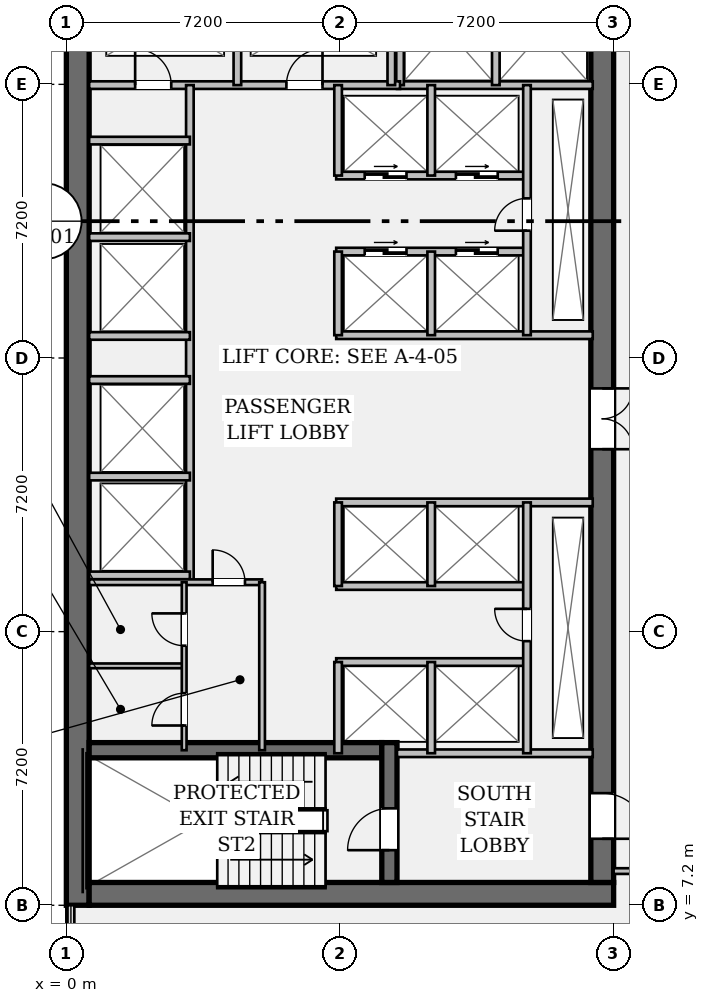
"""IFC4 building model, lengths in metres.
Left out: names, types, materials, properties, quantities, classifications, styles, units other than length and angle.
Written with IfcOpenShell. Run it as: python <this file> out.ifc"""

import sys

from ifc_helpers import new_model, si_unit, direction, frame, frame_2d, origin, place, context, subcontext, project, spatial, rectangle, extrude, element, fill, save


model = new_model("IFC4")
c1 = context("Model", 3, precision=1e-05, world=origin(), true_north=direction((0.0, 1.0)))
c2 = subcontext(c1, "Body", "Model", "MODEL_VIEW")
j1 = project(units=[si_unit("LENGTHUNIT", "METRE"), si_unit("PLANEANGLEUNIT", "RADIAN")], contexts=[c1])
p1 = place(None, origin())
s1 = spatial("IfcSite", under=j1, at=p1, CompositionType="ELEMENT")
p2 = place(p1, origin())
s2 = spatial("IfcBuilding", under=s1, at=p2, CompositionType="ELEMENT")
p3 = place(p2, frame((0.0, 0.0, 65.8)))
s3 = spatial("IfcBuildingStorey", under=s2, at=p3, CompositionType="ELEMENT", Elevation=65.8)
p4 = place(p3, frame((0.3, 7.2, 0.0), z_axis=(0.0, 0.0, 1.0), x_axis=(0.0, 1.0, 0.0)))
e1 = element("IfcWall", 1, at=p4, inside=s3, PredefinedType="SHEAR", context=c2, shape_type="SweptSolid", body=[
    extrude(rectangle(XDim=28.8, YDim=0.6, at=frame_2d((14.4, 0.0))), origin(), (0.0, 0.0, 1.0), 3.57),
])
p5 = place(p3, frame((0.6, 7.5, 0.0), z_axis=(0.0, 0.0, 1.0), x_axis=(1.0, 0.0, 0.0)))
e2 = element("IfcWall", 2, at=p5, inside=s3, PredefinedType="SHEAR", context=c2, shape_type="SweptSolid", body=[
    extrude(rectangle(XDim=13.8, YDim=0.6, at=frame_2d((6.9, 0.0))), origin(), (0.0, 0.0, 1.0), 3.57),
])
p6 = place(p3, frame((14.1, 35.4, 0.0), z_axis=(0.0, 0.0, 1.0), x_axis=(0.0, -1.0, 0.0)))
e3 = element("IfcWall", 3, at=p6, inside=s3, PredefinedType="SHEAR", context=c2, shape_type="SweptSolid", body=[
    extrude(rectangle(XDim=27.6, YDim=0.6, at=frame_2d((13.8, 0.0))), origin(), (0.0, 0.0, 1.0), 3.57),
])
p7 = place(p6, frame((1.3, 0.0, 0.0)))
e4 = element("IfcOpeningElement", 4, at=p7, cuts=e3, PredefinedType="OPENING", context=c2, shape_type="SweptSolid", body=[
    extrude(rectangle(XDim=1.2, YDim=2.15, at=frame_2d((0.6, 1.075))), frame((0.0, 0.312, 0.0), z_axis=(0.0, -1.0, 0.0), x_axis=(1.0, 0.0, 0.0)), (0.0, 0.0, 1.0), 0.624),
])
p8 = place(p6, frame((25.25, 0.0, 0.0)))
e5 = element("IfcOpeningElement", 5, at=p8, cuts=e3, PredefinedType="OPENING", context=c2, shape_type="SweptSolid", body=[
    extrude(rectangle(XDim=1.2, YDim=2.15, at=frame_2d((0.6, 1.075))), frame((0.0, 0.312, 0.0), z_axis=(0.0, -1.0, 0.0), x_axis=(1.0, 0.0, 0.0)), (0.0, 0.0, 1.0), 0.624),
])
p9 = place(p6, frame((14.6, 0.0, 0.0)))
e6 = element("IfcOpeningElement", 6, at=p9, cuts=e3, PredefinedType="OPENING", context=c2, shape_type="SweptSolid", body=[
    extrude(rectangle(XDim=1.6, YDim=2.2, at=frame_2d((0.8, 1.1))), frame((0.0, 0.312, 0.0), z_axis=(0.0, -1.0, 0.0), x_axis=(1.0, 0.0, 0.0)), (0.0, 0.0, 1.0), 0.624),
])
p10 = place(p3, frame((0.6, 11.28, 0.0), z_axis=(0.0, 0.0, 1.0), x_axis=(1.0, 0.0, 0.0)))
e7 = element("IfcWall", 7, at=p10, inside=s3, PredefinedType="SHEAR", context=c2, shape_type="SweptSolid", body=[
    extrude(rectangle(XDim=7.7, YDim=0.4, at=frame_2d((3.85, 0.0))), origin(), (0.0, 0.0, 1.0), 3.57),
])
p11 = place(p3, frame((8.5, 7.8, 0.0), z_axis=(0.0, 0.0, 1.0), x_axis=(0.0, 1.0, 0.0)))
e8 = element("IfcWall", 8, at=p11, inside=s3, PredefinedType="SHEAR", context=c2, shape_type="SweptSolid", body=[
    extrude(rectangle(XDim=3.68, YDim=0.4, at=frame_2d((1.84, 0.0))), origin(), (0.0, 0.0, 1.0), 3.57),
])
p12 = place(p11, frame((0.85, 0.0, 0.0)))
e9 = element("IfcOpeningElement", 9, at=p12, cuts=e8, PredefinedType="OPENING", context=c2, shape_type="SweptSolid", body=[
    extrude(rectangle(XDim=1.1, YDim=2.15, at=frame_2d((0.55, 1.075))), frame((0.0, 0.212, 0.0), z_axis=(0.0, -1.0, 0.0), x_axis=(1.0, 0.0, 0.0)), (0.0, 0.0, 1.0), 0.424),
])
for number, where, z_axis, x_axis in (
    (10, (8.7, 11.2, 0.0), (0.0, 0.0, 1.0), (1.0, 0.0, 0.0)),
    (11, (8.7, 28.78, 0.0), (0.0, 0.0, 1.0), (1.0, 0.0, 0.0)),
):
    element("IfcWall", number, at=place(p3, frame(where, z_axis=z_axis, x_axis=x_axis)), inside=s3, PredefinedType="PARTITIONING", context=c2, shape_type="SweptSolid", body=[
        extrude(rectangle(XDim=5.15, YDim=0.2, at=frame_2d((2.575, 0.0))), origin(), (0.0, 0.0, 1.0), 3.57),
    ])
for number, where, z_axis, x_axis in (
    (12, (8.78, 28.78, 0.0), (0.0, 0.0, 1.0), (0.0, 1.0, 0.0)),
    (13, (11.3, 28.78, 0.0), (0.0, 0.0, 1.0), (0.0, 1.0, 0.0)),
):
    element("IfcWall", number, at=place(p3, frame(where, z_axis=z_axis, x_axis=x_axis)), inside=s3, PredefinedType="PARTITIONING", context=c2, shape_type="SweptSolid", body=[
        extrude(rectangle(XDim=3.1, YDim=0.2, at=frame_2d((1.55, 0.0))), origin(), (0.0, 0.0, 1.0), 3.57),
    ])
p13 = place(p3, frame((0.6, 28.78, 0.0), z_axis=(0.0, 0.0, 1.0), x_axis=(1.0, 0.0, 0.0)))
e14 = element("IfcWall", 14, at=p13, inside=s3, PredefinedType="PARTITIONING", context=c2, shape_type="SweptSolid", body=[
    extrude(rectangle(XDim=8.18, YDim=0.2, at=frame_2d((4.09, 0.0))), origin(), (0.0, 0.0, 1.0), 3.57),
])
p14 = place(p13, frame((1.21, 0.0, 0.0)))
e15 = element("IfcOpeningElement", 15, at=p14, cuts=e14, PredefinedType="OPENING", context=c2, shape_type="SweptSolid", body=[
    extrude(rectangle(XDim=0.95, YDim=2.15, at=frame_2d((0.475, 1.075))), frame((0.0, 0.112, 0.0), z_axis=(0.0, -1.0, 0.0), x_axis=(1.0, 0.0, 0.0)), (0.0, 0.0, 1.0), 0.224),
])
p15 = place(p13, frame((5.19, 0.0, 0.0)))
e16 = element("IfcOpeningElement", 16, at=p15, cuts=e14, PredefinedType="OPENING", context=c2, shape_type="SweptSolid", body=[
    extrude(rectangle(XDim=0.95, YDim=2.15, at=frame_2d((0.475, 1.075))), frame((0.0, 0.112, 0.0), z_axis=(0.0, -1.0, 0.0), x_axis=(1.0, 0.0, 0.0)), (0.0, 0.0, 1.0), 0.224),
])
for number, where, z_axis, x_axis in (
    (17, (4.5, 28.78, 0.0), (0.0, 0.0, 1.0), (0.0, 1.0, 0.0)),
    (18, (8.55, 28.78, 0.0), (0.0, 0.0, 1.0), (0.0, 1.0, 0.0)),
):
    element("IfcWall", number, at=place(p3, frame(where, z_axis=z_axis, x_axis=x_axis)), inside=s3, PredefinedType="PARTITIONING", context=c2, shape_type="SweptSolid", body=[
        extrude(rectangle(XDim=2.94, YDim=0.2, at=frame_2d((1.47, 0.0))), origin(), (0.0, 0.0, 1.0), 3.57),
    ])
p16 = place(p3, frame((3.25, 15.7, 0.0), z_axis=(0.0, 0.0, 1.0), x_axis=(0.0, 1.0, 0.0)))
e19 = element("IfcWall", 19, at=p16, inside=s3, PredefinedType="PARTITIONING", context=c2, shape_type="SweptSolid", body=[
    extrude(rectangle(XDim=13.08, YDim=0.2, at=frame_2d((6.54, 0.0))), origin(), (0.0, 0.0, 1.0), 3.57),
])
for number, where, z_axis, x_axis in (
    (20, (0.6, 15.88, 0.0), (0.0, 0.0, 1.0), (1.0, 0.0, 0.0)),
    (21, (0.6, 18.48, 0.0), (0.0, 0.0, 1.0), (1.0, 0.0, 0.0)),
    (22, (0.6, 22.18, 0.0), (0.0, 0.0, 1.0), (1.0, 0.0, 0.0)),
    (23, (0.6, 24.78, 0.0), (0.0, 0.0, 1.0), (1.0, 0.0, 0.0)),
    (24, (0.6, 21.02, 0.0), (0.0, 0.0, 1.0), (1.0, 0.0, 0.0)),
    (25, (0.6, 27.32, 0.0), (0.0, 0.0, 1.0), (1.0, 0.0, 0.0)),
):
    element("IfcWall", number, at=place(p3, frame(where, z_axis=z_axis, x_axis=x_axis)), inside=s3, PredefinedType="PARTITIONING", context=c2, shape_type="SweptSolid", body=[
        extrude(rectangle(XDim=2.65, YDim=0.2, at=frame_2d((1.325, 0.0))), origin(), (0.0, 0.0, 1.0), 3.57),
    ])
p17 = place(p3, frame((7.1, 22.2, 0.0), z_axis=(0.0, 0.0, 1.0), x_axis=(1.0, 0.0, 0.0)))
e26 = element("IfcWall", 26, at=p17, inside=s3, PredefinedType="PARTITIONING", context=c2, shape_type="SweptSolid", body=[
    extrude(rectangle(XDim=6.75, YDim=0.2, at=frame_2d((3.375, 0.0))), origin(), (0.0, 0.0, 1.0), 3.57),
])
p18 = place(p3, frame((7.1, 24.4, 0.0), z_axis=(0.0, 0.0, 1.0), x_axis=(1.0, 0.0, 0.0)))
e27 = element("IfcWall", 27, at=p18, inside=s3, PredefinedType="PARTITIONING", context=c2, shape_type="SweptSolid", body=[
    extrude(rectangle(XDim=5.02, YDim=0.2, at=frame_2d((2.51, 0.0))), origin(), (0.0, 0.0, 1.0), 3.57),
])
p19 = place(p18, frame((0.75, 0.0, 0.0)))
e28 = element("IfcOpeningElement", 28, at=p19, cuts=e27, PredefinedType="OPENING", context=c2, shape_type="SweptSolid", body=[
    extrude(rectangle(XDim=1.1, YDim=2.2, at=frame_2d((0.55, 1.1))), frame((0.0, 0.112, 0.0), z_axis=(0.0, -1.0, 0.0), x_axis=(1.0, 0.0, 0.0)), (0.0, 0.0, 1.0), 0.224),
])
p20 = place(p18, frame((3.15, 0.0, 0.0)))
e29 = element("IfcOpeningElement", 29, at=p20, cuts=e27, PredefinedType="OPENING", context=c2, shape_type="SweptSolid", body=[
    extrude(rectangle(XDim=1.1, YDim=2.2, at=frame_2d((0.55, 1.1))), frame((0.0, 0.112, 0.0), z_axis=(0.0, -1.0, 0.0), x_axis=(1.0, 0.0, 0.0)), (0.0, 0.0, 1.0), 0.224),
])
p21 = place(p3, frame((7.1, 26.4, 0.0), z_axis=(0.0, 0.0, 1.0), x_axis=(1.0, 0.0, 0.0)))
e30 = element("IfcWall", 30, at=p21, inside=s3, PredefinedType="PARTITIONING", context=c2, shape_type="SweptSolid", body=[
    extrude(rectangle(XDim=5.02, YDim=0.2, at=frame_2d((2.51, 0.0))), origin(), (0.0, 0.0, 1.0), 3.57),
])
p22 = place(p21, frame((0.75, 0.0, 0.0)))
e31 = element("IfcOpeningElement", 31, at=p22, cuts=e30, PredefinedType="OPENING", context=c2, shape_type="SweptSolid", body=[
    extrude(rectangle(XDim=1.1, YDim=2.2, at=frame_2d((0.55, 1.1))), frame((0.0, 0.112, 0.0), z_axis=(0.0, -1.0, 0.0), x_axis=(1.0, 0.0, 0.0)), (0.0, 0.0, 1.0), 0.224),
])
p23 = place(p21, frame((3.15, 0.0, 0.0)))
e32 = element("IfcOpeningElement", 32, at=p23, cuts=e30, PredefinedType="OPENING", context=c2, shape_type="SweptSolid", body=[
    extrude(rectangle(XDim=1.1, YDim=2.2, at=frame_2d((0.55, 1.1))), frame((0.0, 0.112, 0.0), z_axis=(0.0, -1.0, 0.0), x_axis=(1.0, 0.0, 0.0)), (0.0, 0.0, 1.0), 0.224),
])
p24 = place(p3, frame((7.15, 22.2, 0.0), z_axis=(0.0, 0.0, 1.0), x_axis=(0.0, 1.0, 0.0)))
e33 = element("IfcWall", 33, at=p24, inside=s3, PredefinedType="PARTITIONING", context=c2, shape_type="SweptSolid", body=[
    extrude(rectangle(XDim=2.2, YDim=0.2, at=frame_2d((1.1, 0.0))), origin(), (0.0, 0.0, 1.0), 3.57),
])
p25 = place(p3, frame((7.15, 26.4, 0.0), z_axis=(0.0, 0.0, 1.0), x_axis=(0.0, 1.0, 0.0)))
e34 = element("IfcWall", 34, at=p25, inside=s3, PredefinedType="PARTITIONING", context=c2, shape_type="SweptSolid", body=[
    extrude(rectangle(XDim=2.38, YDim=0.2, at=frame_2d((1.19, 0.0))), origin(), (0.0, 0.0, 1.0), 3.57),
])
p26 = place(p3, frame((9.6, 22.2, 0.0), z_axis=(0.0, 0.0, 1.0), x_axis=(0.0, 1.0, 0.0)))
e35 = element("IfcWall", 35, at=p26, inside=s3, PredefinedType="PARTITIONING", context=c2, shape_type="SweptSolid", body=[
    extrude(rectangle(XDim=2.2, YDim=0.2, at=frame_2d((1.1, 0.0))), origin(), (0.0, 0.0, 1.0), 3.57),
])
p27 = place(p3, frame((9.6, 26.4, 0.0), z_axis=(0.0, 0.0, 1.0), x_axis=(0.0, 1.0, 0.0)))
e36 = element("IfcWall", 36, at=p27, inside=s3, PredefinedType="PARTITIONING", context=c2, shape_type="SweptSolid", body=[
    extrude(rectangle(XDim=2.38, YDim=0.2, at=frame_2d((1.19, 0.0))), origin(), (0.0, 0.0, 1.0), 3.57),
])
p28 = place(p3, frame((12.12, 22.2, 0.0), z_axis=(0.0, 0.0, 1.0), x_axis=(0.0, 1.0, 0.0)))
e37 = element("IfcWall", 37, at=p28, inside=s3, PredefinedType="PARTITIONING", context=c2, shape_type="SweptSolid", body=[
    extrude(rectangle(XDim=6.58, YDim=0.2, at=frame_2d((3.29, 0.0))), origin(), (0.0, 0.0, 1.0), 3.57),
])
p29 = place(p28, frame((2.75, 0.0, 0.0)))
e38 = element("IfcOpeningElement", 38, at=p29, cuts=e37, PredefinedType="OPENING", context=c2, shape_type="SweptSolid", body=[
    extrude(rectangle(XDim=0.85, YDim=2.15, at=frame_2d((0.425, 1.075))), frame((0.0, 0.112, 0.0), z_axis=(0.0, -1.0, 0.0), x_axis=(1.0, 0.0, 0.0)), (0.0, 0.0, 1.0), 0.224),
])
p30 = place(p3, frame((7.1, 17.8, 0.0), z_axis=(0.0, 0.0, 1.0), x_axis=(1.0, 0.0, 0.0)))
e39 = element("IfcWall", 39, at=p30, inside=s3, PredefinedType="PARTITIONING", context=c2, shape_type="SweptSolid", body=[
    extrude(rectangle(XDim=6.75, YDim=0.2, at=frame_2d((3.375, 0.0))), origin(), (0.0, 0.0, 1.0), 3.57),
])
for number, where, z_axis, x_axis in (
    (40, (7.1, 15.6, 0.0), (0.0, 0.0, 1.0), (1.0, 0.0, 0.0)),
    (41, (7.1, 13.6, 0.0), (0.0, 0.0, 1.0), (1.0, 0.0, 0.0)),
):
    element("IfcWall", number, at=place(p3, frame(where, z_axis=z_axis, x_axis=x_axis)), inside=s3, PredefinedType="PARTITIONING", context=c2, shape_type="SweptSolid", body=[
        extrude(rectangle(XDim=5.02, YDim=0.2, at=frame_2d((2.51, 0.0))), origin(), (0.0, 0.0, 1.0), 3.57),
    ])
p31 = place(p3, frame((7.15, 15.6, 0.0), z_axis=(0.0, 0.0, 1.0), x_axis=(0.0, 1.0, 0.0)))
e42 = element("IfcWall", 42, at=p31, inside=s3, PredefinedType="PARTITIONING", context=c2, shape_type="SweptSolid", body=[
    extrude(rectangle(XDim=2.2, YDim=0.2, at=frame_2d((1.1, 0.0))), origin(), (0.0, 0.0, 1.0), 3.57),
])
p32 = place(p3, frame((7.15, 11.2, 0.0), z_axis=(0.0, 0.0, 1.0), x_axis=(0.0, 1.0, 0.0)))
e43 = element("IfcWall", 43, at=p32, inside=s3, PredefinedType="PARTITIONING", context=c2, shape_type="SweptSolid", body=[
    extrude(rectangle(XDim=2.4, YDim=0.2, at=frame_2d((1.2, 0.0))), origin(), (0.0, 0.0, 1.0), 3.57),
])
p33 = place(p3, frame((9.6, 15.6, 0.0), z_axis=(0.0, 0.0, 1.0), x_axis=(0.0, 1.0, 0.0)))
e44 = element("IfcWall", 44, at=p33, inside=s3, PredefinedType="PARTITIONING", context=c2, shape_type="SweptSolid", body=[
    extrude(rectangle(XDim=2.2, YDim=0.2, at=frame_2d((1.1, 0.0))), origin(), (0.0, 0.0, 1.0), 3.57),
])
p34 = place(p3, frame((9.6, 11.2, 0.0), z_axis=(0.0, 0.0, 1.0), x_axis=(0.0, 1.0, 0.0)))
e45 = element("IfcWall", 45, at=p34, inside=s3, PredefinedType="PARTITIONING", context=c2, shape_type="SweptSolid", body=[
    extrude(rectangle(XDim=2.4, YDim=0.2, at=frame_2d((1.2, 0.0))), origin(), (0.0, 0.0, 1.0), 3.57),
])
p35 = place(p3, frame((12.12, 11.2, 0.0), z_axis=(0.0, 0.0, 1.0), x_axis=(0.0, 1.0, 0.0)))
e46 = element("IfcWall", 46, at=p35, inside=s3, PredefinedType="PARTITIONING", context=c2, shape_type="SweptSolid", body=[
    extrude(rectangle(XDim=6.6, YDim=0.2, at=frame_2d((3.3, 0.0))), origin(), (0.0, 0.0, 1.0), 3.57),
])
p36 = place(p35, frame((2.95, 0.0, 0.0)))
e47 = element("IfcOpeningElement", 47, at=p36, cuts=e46, PredefinedType="OPENING", context=c2, shape_type="SweptSolid", body=[
    extrude(rectangle(XDim=0.85, YDim=2.15, at=frame_2d((0.425, 1.075))), frame((0.0, 0.112, 0.0), z_axis=(0.0, -1.0, 0.0), x_axis=(1.0, 0.0, 0.0)), (0.0, 0.0, 1.0), 0.224),
])
p37 = place(p3, frame((0.6, 15.7, 0.0), z_axis=(0.0, 0.0, 1.0), x_axis=(1.0, 0.0, 0.0)))
e48 = element("IfcWall", 48, at=p37, inside=s3, PredefinedType="PARTITIONING", context=c2, shape_type="SweptSolid", body=[
    extrude(rectangle(XDim=4.55, YDim=0.15, at=frame_2d((2.275, 0.0))), origin(), (0.0, 0.0, 1.0), 3.57),
])
p38 = place(p37, frame((3.25, 0.0, 0.0)))
e49 = element("IfcOpeningElement", 49, at=p38, cuts=e48, PredefinedType="OPENING", context=c2, shape_type="SweptSolid", body=[
    extrude(rectangle(XDim=0.85, YDim=2.15, at=frame_2d((0.425, 1.075))), frame((0.0, 0.087, 0.0), z_axis=(0.0, -1.0, 0.0), x_axis=(1.0, 0.0, 0.0)), (0.0, 0.0, 1.0), 0.174),
])
p39 = place(p3, frame((5.15, 11.28, 0.0), z_axis=(0.0, 0.0, 1.0), x_axis=(0.0, 1.0, 0.0)))
e50 = element("IfcWall", 50, at=p39, inside=s3, PredefinedType="PARTITIONING", context=c2, shape_type="SweptSolid", body=[
    extrude(rectangle(XDim=4.42, YDim=0.15, at=frame_2d((2.21, 0.0))), origin(), (0.0, 0.0, 1.0), 3.57),
])
p40 = place(p3, frame((0.6, 13.5, 0.0), z_axis=(0.0, 0.0, 1.0), x_axis=(1.0, 0.0, 0.0)))
e51 = element("IfcWall", 51, at=p40, inside=s3, PredefinedType="PARTITIONING", context=c2, shape_type="SweptSolid", body=[
    extrude(rectangle(XDim=2.5, YDim=0.125, at=frame_2d((1.25, 0.0))), origin(), (0.0, 0.0, 1.0), 3.57),
])
p41 = place(p3, frame((3.1, 11.28, 0.0), z_axis=(0.0, 0.0, 1.0), x_axis=(0.0, 1.0, 0.0)))
e52 = element("IfcWall", 52, at=p41, inside=s3, PredefinedType="PARTITIONING", context=c2, shape_type="SweptSolid", body=[
    extrude(rectangle(XDim=4.42, YDim=0.125, at=frame_2d((2.21, 0.0))), origin(), (0.0, 0.0, 1.0), 3.57),
])
p42 = place(p41, frame((0.65, 0.0, 0.0)))
e53 = element("IfcOpeningElement", 53, at=p42, cuts=e52, PredefinedType="OPENING", context=c2, shape_type="SweptSolid", body=[
    extrude(rectangle(XDim=0.85, YDim=2.15, at=frame_2d((0.425, 1.075))), frame((0.0, 0.074, 0.0), z_axis=(0.0, -1.0, 0.0), x_axis=(1.0, 0.0, 0.0)), (0.0, 0.0, 1.0), 0.149),
])
p43 = place(p41, frame((2.75, 0.0, 0.0)))
e54 = element("IfcOpeningElement", 54, at=p43, cuts=e52, PredefinedType="OPENING", context=c2, shape_type="SweptSolid", body=[
    extrude(rectangle(XDim=0.85, YDim=2.15, at=frame_2d((0.425, 1.075))), frame((0.0, 0.074, 0.0), z_axis=(0.0, -1.0, 0.0), x_axis=(1.0, 0.0, 0.0)), (0.0, 0.0, 1.0), 0.149),
])
p44 = place(p3, frame((14.4, 8.1, 0.0), z_axis=(0.0, 0.0, 1.0), x_axis=(1.0, 0.0, 0.0)))
e55 = element("IfcWall", 55, at=p44, inside=s3, PredefinedType="PARTITIONING", context=c2, shape_type="SweptSolid", body=[
    extrude(rectangle(XDim=2.95, YDim=0.15, at=frame_2d((1.475, 0.0))), origin(), (0.0, 0.0, 1.0), 3.088),
])
p45 = place(p44, frame((0.95, 0.0, 0.0)))
e56 = element("IfcOpeningElement", 56, at=p45, cuts=e55, PredefinedType="OPENING", context=c2, shape_type="SweptSolid", body=[
    extrude(rectangle(XDim=0.95, YDim=2.15, at=frame_2d((0.475, 1.075))), frame((0.0, 0.087, 0.0), z_axis=(0.0, -1.0, 0.0), x_axis=(1.0, 0.0, 0.0)), (0.0, 0.0, 1.0), 0.174),
])
p46 = place(p12, origin())
e57 = element("IfcDoor", 57, at=p46, inside=s3, OperationType="SINGLE_SWING_LEFT", PredefinedType="DOOR", context=c2, shape_type="SweptSolid", body=[
    extrude(rectangle(XDim=1.1, YDim=2.15, at=frame_2d((0.55, 1.075))), frame((0.0, 0.025, 0.0), z_axis=(0.0, -1.0, 0.0), x_axis=(1.0, 0.0, 0.0)), (0.0, 0.0, 1.0), 0.05),
])
fill(e9, e57)
p47 = place(p8, origin())
e58 = element("IfcDoor", 58, at=p47, inside=s3, OperationType="SINGLE_SWING_RIGHT", PredefinedType="DOOR", context=c2, shape_type="SweptSolid", body=[
    extrude(rectangle(XDim=1.2, YDim=2.15, at=frame_2d((0.6, 1.075))), frame((0.0, 0.025, 0.0), z_axis=(0.0, -1.0, 0.0), x_axis=(1.0, 0.0, 0.0)), (0.0, 0.0, 1.0), 0.05),
])
fill(e5, e58)
p48 = place(p14, origin())
e59 = element("IfcDoor", 59, at=p48, inside=s3, OperationType="SINGLE_SWING_LEFT", PredefinedType="DOOR", context=c2, shape_type="SweptSolid", body=[
    extrude(rectangle(XDim=0.95, YDim=2.15, at=frame_2d((0.475, 1.075))), frame((0.0, 0.025, 0.0), z_axis=(0.0, -1.0, 0.0), x_axis=(1.0, 0.0, 0.0)), (0.0, 0.0, 1.0), 0.05),
])
fill(e15, e59)
p49 = place(p15, origin())
e60 = element("IfcDoor", 60, at=p49, inside=s3, OperationType="SINGLE_SWING_RIGHT", PredefinedType="DOOR", context=c2, shape_type="SweptSolid", body=[
    extrude(rectangle(XDim=0.95, YDim=2.15, at=frame_2d((0.475, 1.075))), frame((0.0, 0.025, 0.0), z_axis=(0.0, -1.0, 0.0), x_axis=(1.0, 0.0, 0.0)), (0.0, 0.0, 1.0), 0.05),
])
fill(e16, e60)
p50 = place(p9, origin())
e61 = element("IfcDoor", 61, at=p50, inside=s3, OperationType="DOUBLE_DOOR_SINGLE_SWING", PredefinedType="DOOR", context=c2, shape_type="SweptSolid", body=[
    extrude(rectangle(XDim=1.6, YDim=2.2, at=frame_2d((0.8, 1.1))), frame((0.0, 0.025, 0.0), z_axis=(0.0, -1.0, 0.0), x_axis=(1.0, 0.0, 0.0)), (0.0, 0.0, 1.0), 0.05),
])
fill(e6, e61)
p51 = place(p29, origin())
e62 = element("IfcDoor", 62, at=p51, inside=s3, OperationType="SINGLE_SWING_LEFT", PredefinedType="DOOR", context=c2, shape_type="SweptSolid", body=[
    extrude(rectangle(XDim=0.85, YDim=2.15, at=frame_2d((0.425, 1.075))), frame((0.0, 0.025, 0.0), z_axis=(0.0, -1.0, 0.0), x_axis=(1.0, 0.0, 0.0)), (0.0, 0.0, 1.0), 0.05),
])
fill(e38, e62)
p52 = place(p19, origin())
e63 = element("IfcDoor", 63, at=p52, inside=s3, OperationType="DOUBLE_DOOR_SLIDING", PredefinedType="DOOR", context=c2, shape_type="SweptSolid", body=[
    extrude(rectangle(XDim=1.1, YDim=2.2, at=frame_2d((0.55, 1.1))), frame((0.0, 0.025, 0.0), z_axis=(0.0, -1.0, 0.0), x_axis=(1.0, 0.0, 0.0)), (0.0, 0.0, 1.0), 0.05),
])
fill(e28, e63)
p53 = place(p20, origin())
e64 = element("IfcDoor", 64, at=p53, inside=s3, OperationType="DOUBLE_DOOR_SLIDING", PredefinedType="DOOR", context=c2, shape_type="SweptSolid", body=[
    extrude(rectangle(XDim=1.1, YDim=2.2, at=frame_2d((0.55, 1.1))), frame((0.0, 0.025, 0.0), z_axis=(0.0, -1.0, 0.0), x_axis=(1.0, 0.0, 0.0)), (0.0, 0.0, 1.0), 0.05),
])
fill(e29, e64)
p54 = place(p22, origin())
e65 = element("IfcDoor", 65, at=p54, inside=s3, OperationType="DOUBLE_DOOR_SLIDING", PredefinedType="DOOR", context=c2, shape_type="SweptSolid", body=[
    extrude(rectangle(XDim=1.1, YDim=2.2, at=frame_2d((0.55, 1.1))), frame((0.0, 0.025, 0.0), z_axis=(0.0, -1.0, 0.0), x_axis=(1.0, 0.0, 0.0)), (0.0, 0.0, 1.0), 0.05),
])
fill(e31, e65)
p55 = place(p23, origin())
e66 = element("IfcDoor", 66, at=p55, inside=s3, OperationType="DOUBLE_DOOR_SLIDING", PredefinedType="DOOR", context=c2, shape_type="SweptSolid", body=[
    extrude(rectangle(XDim=1.1, YDim=2.2, at=frame_2d((0.55, 1.1))), frame((0.0, 0.025, 0.0), z_axis=(0.0, -1.0, 0.0), x_axis=(1.0, 0.0, 0.0)), (0.0, 0.0, 1.0), 0.05),
])
fill(e32, e66)
p56 = place(p36, origin())
e67 = element("IfcDoor", 67, at=p56, inside=s3, OperationType="SINGLE_SWING_RIGHT", PredefinedType="DOOR", context=c2, shape_type="SweptSolid", body=[
    extrude(rectangle(XDim=0.85, YDim=2.15, at=frame_2d((0.425, 1.075))), frame((0.0, 0.025, 0.0), z_axis=(0.0, -1.0, 0.0), x_axis=(1.0, 0.0, 0.0)), (0.0, 0.0, 1.0), 0.05),
])
fill(e47, e67)
p57 = place(p38, origin())
e68 = element("IfcDoor", 68, at=p57, inside=s3, OperationType="SINGLE_SWING_LEFT", PredefinedType="DOOR", context=c2, shape_type="SweptSolid", body=[
    extrude(rectangle(XDim=0.85, YDim=2.15, at=frame_2d((0.425, 1.075))), frame((0.0, 0.025, 0.0), z_axis=(0.0, -1.0, 0.0), x_axis=(1.0, 0.0, 0.0)), (0.0, 0.0, 1.0), 0.05),
])
fill(e49, e68)
p58 = place(p42, origin())
e69 = element("IfcDoor", 69, at=p58, inside=s3, OperationType="SINGLE_SWING_LEFT", PredefinedType="DOOR", context=c2, shape_type="SweptSolid", body=[
    extrude(rectangle(XDim=0.85, YDim=2.15, at=frame_2d((0.425, 1.075))), frame((0.0, 0.025, 0.0), z_axis=(0.0, -1.0, 0.0), x_axis=(1.0, 0.0, 0.0)), (0.0, 0.0, 1.0), 0.05),
])
fill(e53, e69)
p59 = place(p43, origin())
e70 = element("IfcDoor", 70, at=p59, inside=s3, OperationType="SINGLE_SWING_RIGHT", PredefinedType="DOOR", context=c2, shape_type="SweptSolid", body=[
    extrude(rectangle(XDim=0.85, YDim=2.15, at=frame_2d((0.425, 1.075))), frame((0.0, 0.025, 0.0), z_axis=(0.0, -1.0, 0.0), x_axis=(1.0, 0.0, 0.0)), (0.0, 0.0, 1.0), 0.05),
])
fill(e54, e70)
save(model, sys.argv[1])
